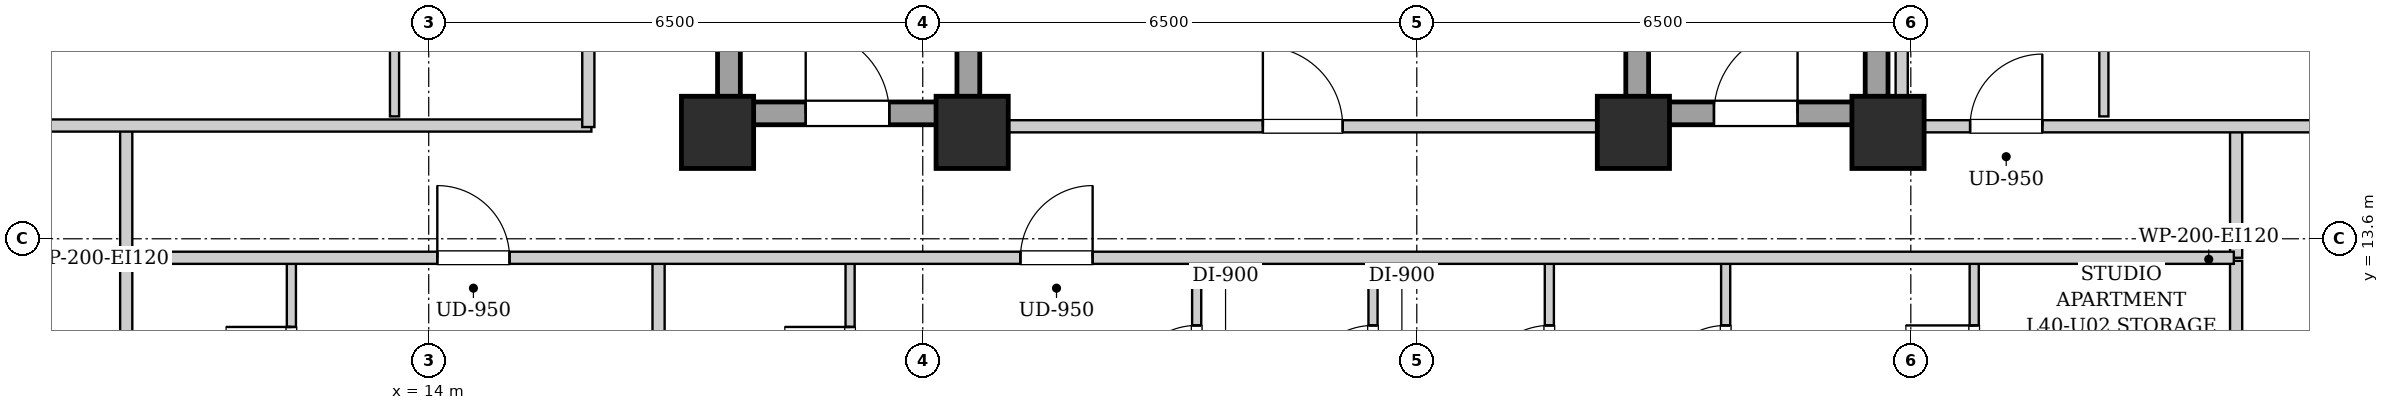
"""IFC4 building model, lengths in metres.
Left out: names, types, materials, properties, quantities, classifications, styles, units other than length and angle.
Written with IfcOpenShell. Run it as: python <this file> out.ifc"""

import sys

from ifc_helpers import new_model, si_unit, direction, frame, frame_2d, origin, origin_2d, place, context, subcontext, project, spatial, rectangle, extrude, element, fill, save


model = new_model("IFC4")
c1 = context("Model", 3, precision=1e-05, world=origin(), true_north=direction((0.0, 1.0)))
c2 = subcontext(c1, "Body", "Model", "MODEL_VIEW")
j1 = project(units=[si_unit("LENGTHUNIT", "METRE"), si_unit("PLANEANGLEUNIT", "RADIAN")], contexts=[c1])
p1 = place(None, origin())
s1 = spatial("IfcSite", under=j1, at=p1, CompositionType="ELEMENT")
p2 = place(p1, origin())
s2 = spatial("IfcBuilding", under=s1, at=p2, CompositionType="ELEMENT")
p3 = place(p2, frame((0.0, 0.0, 140.65)))
s3 = spatial("IfcBuildingStorey", under=s2, at=p3, CompositionType="ELEMENT", Elevation=140.65)
for number, where, z_axis, x_axis in (
    (1, (17.8, 15.0, 0.0), (0.0, 0.0, 1.0), (1.0, 0.0, 0.0)),
    (2, (21.15, 15.0, 0.0), (0.0, 0.0, 1.0), (1.0, 0.0, 0.0)),
    (3, (29.85, 15.0, 0.0), (0.0, 0.0, 1.0), (1.0, 0.0, 0.0)),
    (4, (33.2, 15.0, 0.0), (0.0, 0.0, 1.0), (1.0, 0.0, 0.0)),
):
    element("IfcColumn", number, at=place(p3, frame(where, z_axis=z_axis, x_axis=x_axis)), inside=s3, PredefinedType="COLUMN", context=c2, shape_type="SweptSolid", body=[
        extrude(rectangle(XDim=0.95, YDim=0.95, at=origin_2d()), origin(), (0.0, 0.0, 1.0), 3.25),
    ])
for number, where, z_axis, x_axis in (
    (5, (17.95, 15.1, 0.0), (0.0, 0.0, 1.0), (0.0, 1.0, 0.0)),
    (6, (21.1, 15.1, 0.0), (0.0, 0.0, 1.0), (0.0, 1.0, 0.0)),
):
    element("IfcWall", number, at=place(p3, frame(where, z_axis=z_axis, x_axis=x_axis)), inside=s3, PredefinedType="SHEAR", context=c2, shape_type="SweptSolid", body=[
        extrude(rectangle(XDim=9.0, YDim=0.3, at=frame_2d((4.5, 0.0))), origin(), (0.0, 0.0, 1.0), 2.99),
    ])
p4 = place(p3, frame((18.1, 15.25, 0.0), z_axis=(0.0, 0.0, 1.0), x_axis=(1.0, 0.0, 0.0)))
e7 = element("IfcWall", 7, at=p4, inside=s3, PredefinedType="SHEAR", context=c2, shape_type="SweptSolid", body=[
    extrude(rectangle(XDim=2.85, YDim=0.3, at=frame_2d((1.425, 0.0))), origin(), (0.0, 0.0, 1.0), 2.99),
])
p5 = place(p4, frame((0.86, 0.0, 0.0)))
e8 = element("IfcOpeningElement", 8, at=p5, cuts=e7, PredefinedType="OPENING", context=c2, shape_type="SweptSolid", body=[
    extrude(rectangle(XDim=1.1, YDim=2.05, at=frame_2d((0.55, 1.025))), frame((0.0, 0.16, 0.0), z_axis=(0.0, -1.0, 0.0), x_axis=(1.0, 0.0, 0.0)), (0.0, 0.0, 1.0), 0.32),
])
for number, where, z_axis, x_axis in (
    (9, (29.9, 15.1, 0.0), (0.0, 0.0, 1.0), (0.0, 1.0, 0.0)),
    (10, (33.05, 15.1, 0.0), (0.0, 0.0, 1.0), (0.0, 1.0, 0.0)),
):
    element("IfcWall", number, at=place(p3, frame(where, z_axis=z_axis, x_axis=x_axis)), inside=s3, PredefinedType="SHEAR", context=c2, shape_type="SweptSolid", body=[
        extrude(rectangle(XDim=9.0, YDim=0.3, at=frame_2d((4.5, 0.0))), origin(), (0.0, 0.0, 1.0), 2.99),
    ])
p6 = place(p3, frame((30.05, 15.25, 0.0), z_axis=(0.0, 0.0, 1.0), x_axis=(1.0, 0.0, 0.0)))
e11 = element("IfcWall", 11, at=p6, inside=s3, PredefinedType="SHEAR", context=c2, shape_type="SweptSolid", body=[
    extrude(rectangle(XDim=2.85, YDim=0.3, at=frame_2d((1.425, 0.0))), origin(), (0.0, 0.0, 1.0), 2.99),
])
p7 = place(p6, frame((0.86, 0.0, 0.0)))
e12 = element("IfcOpeningElement", 12, at=p7, cuts=e11, PredefinedType="OPENING", context=c2, shape_type="SweptSolid", body=[
    extrude(rectangle(XDim=1.1, YDim=2.05, at=frame_2d((0.55, 1.025))), frame((0.0, 0.16, 0.0), z_axis=(0.0, -1.0, 0.0), x_axis=(1.0, 0.0, 0.0)), (0.0, 0.0, 1.0), 0.32),
])
p8 = place(p3, frame((21.25, 15.08, 0.0), z_axis=(0.0, 0.0, 1.0), x_axis=(1.0, 0.0, 0.0)))
e13 = element("IfcWall", 13, at=p8, inside=s3, PredefinedType="PARTITIONING", context=c2, shape_type="SweptSolid", body=[
    extrude(rectangle(XDim=8.5, YDim=0.16, at=frame_2d((4.25, 0.0))), origin(), (0.0, 0.0, 1.0), 2.426),
])
p9 = place(p8, frame((3.725, 0.0, 0.0)))
e14 = element("IfcOpeningElement", 14, at=p9, cuts=e13, PredefinedType="OPENING", context=c2, shape_type="SweptSolid", body=[
    extrude(rectangle(XDim=1.05, YDim=2.05, at=frame_2d((0.525, 1.025))), frame((0.0, 0.09, 0.0), z_axis=(0.0, -1.0, 0.0), x_axis=(1.0, 0.0, 0.0)), (0.0, 0.0, 1.0), 0.18),
])
for number, where, z_axis, x_axis in (
    (15, (10.02, 13.35, 0.0), (0.0, 0.0, 1.0), (0.0, 1.0, 0.0)),
    (16, (37.78, 13.35, 0.0), (0.0, 0.0, 1.0), (0.0, 1.0, 0.0)),
):
    element("IfcWall", number, at=place(p3, frame(where, z_axis=z_axis, x_axis=x_axis)), inside=s3, PredefinedType="PARTITIONING", context=c2, shape_type="SweptSolid", body=[
        extrude(rectangle(XDim=1.74, YDim=0.16, at=frame_2d((0.87, 0.0))), origin(), (0.0, 0.0, 1.0), 2.99),
    ])
p10 = place(p3, frame((7.78, 15.09, 0.0), z_axis=(0.0, 0.0, 1.0), x_axis=(1.0, 0.0, 0.0)))
e17 = element("IfcWall", 17, at=p10, inside=s3, PredefinedType="PARTITIONING", context=c2, shape_type="SweptSolid", body=[
    extrude(rectangle(XDim=8.36, YDim=0.16, at=frame_2d((4.18, 0.0))), origin(), (0.0, 0.0, 1.0), 2.426),
])
p11 = place(p3, frame((10.02, 10.65, 0.0), z_axis=(0.0, 0.0, 1.0), x_axis=(0.0, 1.0, 0.0)))
e18 = element("IfcWall", 18, at=p11, inside=s3, PredefinedType="PARTITIONING", context=c2, shape_type="SweptSolid", body=[
    extrude(rectangle(XDim=2.66, YDim=0.16, at=frame_2d((1.33, 0.0))), origin(), (0.0, 0.0, 1.0), 2.99),
])
p12 = place(p3, frame((12.193, 10.71, 0.0), z_axis=(0.0, 0.0, 1.0), x_axis=(0.0, 1.0, 0.0)))
e19 = element("IfcWall", 19, at=p12, inside=s3, PredefinedType="PARTITIONING", context=c2, shape_type="SweptSolid", body=[
    extrude(rectangle(XDim=2.6, YDim=0.12, at=frame_2d((1.3, 0.0))), origin(), (0.0, 0.0, 1.0), 2.99),
])
p13 = place(p12, frame((0.87, 0.0, 0.0)))
e20 = element("IfcOpeningElement", 20, at=p13, cuts=e19, PredefinedType="OPENING", context=c2, shape_type="SweptSolid", body=[
    extrude(rectangle(XDim=0.86, YDim=2.05, at=frame_2d((0.43, 1.025))), frame((0.0, 0.07, 0.0), z_axis=(0.0, -1.0, 0.0), x_axis=(1.0, 0.0, 0.0)), (0.0, 0.0, 1.0), 0.14),
])
p14 = place(p3, frame((37.78, 10.65, 0.0), z_axis=(0.0, 0.0, 1.0), x_axis=(0.0, 1.0, 0.0)))
e21 = element("IfcWall", 21, at=p14, inside=s3, PredefinedType="PARTITIONING", context=c2, shape_type="SweptSolid", body=[
    extrude(rectangle(XDim=2.66, YDim=0.16, at=frame_2d((1.33, 0.0))), origin(), (0.0, 0.0, 1.0), 2.99),
])
p15 = place(p3, frame((17.024, 6.06, 0.0), z_axis=(0.0, 0.0, 1.0), x_axis=(0.0, 1.0, 0.0)))
e22 = element("IfcWall", 22, at=p15, inside=s3, PredefinedType="PARTITIONING", context=c2, shape_type="SweptSolid", body=[
    extrude(rectangle(XDim=7.25, YDim=0.16, at=frame_2d((3.625, 0.0))), origin(), (0.0, 0.0, 1.0), 2.99),
])
p16 = place(p3, frame((19.544, 10.71, 0.0), z_axis=(0.0, 0.0, 1.0), x_axis=(0.0, 1.0, 0.0)))
e23 = element("IfcWall", 23, at=p16, inside=s3, PredefinedType="PARTITIONING", context=c2, shape_type="SweptSolid", body=[
    extrude(rectangle(XDim=2.6, YDim=0.12, at=frame_2d((1.3, 0.0))), origin(), (0.0, 0.0, 1.0), 2.99),
])
p17 = place(p16, frame((0.87, 0.0, 0.0)))
e24 = element("IfcOpeningElement", 24, at=p17, cuts=e23, PredefinedType="OPENING", context=c2, shape_type="SweptSolid", body=[
    extrude(rectangle(XDim=0.86, YDim=2.05, at=frame_2d((0.43, 1.025))), frame((0.0, 0.07, 0.0), z_axis=(0.0, -1.0, 0.0), x_axis=(1.0, 0.0, 0.0)), (0.0, 0.0, 1.0), 0.14),
])
p18 = place(p3, frame((24.104, 10.71, 0.0), z_axis=(0.0, 0.0, 1.0), x_axis=(0.0, 1.0, 0.0)))
e25 = element("IfcWall", 25, at=p18, inside=s3, PredefinedType="PARTITIONING", context=c2, shape_type="SweptSolid", body=[
    extrude(rectangle(XDim=2.6, YDim=0.12, at=frame_2d((1.3, 0.0))), origin(), (0.0, 0.0, 1.0), 2.99),
])
p19 = place(p18, frame((0.85, 0.0, 0.0)))
e26 = element("IfcOpeningElement", 26, at=p19, cuts=e25, PredefinedType="OPENING", context=c2, shape_type="SweptSolid", body=[
    extrude(rectangle(XDim=0.9, YDim=2.05, at=frame_2d((0.45, 1.025))), frame((0.0, 0.07, 0.0), z_axis=(0.0, -1.0, 0.0), x_axis=(1.0, 0.0, 0.0)), (0.0, 0.0, 1.0), 0.14),
])
p20 = place(p3, frame((26.424, 10.71, 0.0), z_axis=(0.0, 0.0, 1.0), x_axis=(0.0, 1.0, 0.0)))
e27 = element("IfcWall", 27, at=p20, inside=s3, PredefinedType="PARTITIONING", context=c2, shape_type="SweptSolid", body=[
    extrude(rectangle(XDim=2.6, YDim=0.12, at=frame_2d((1.3, 0.0))), origin(), (0.0, 0.0, 1.0), 2.99),
])
p21 = place(p20, frame((0.85, 0.0, 0.0)))
e28 = element("IfcOpeningElement", 28, at=p21, cuts=e27, PredefinedType="OPENING", context=c2, shape_type="SweptSolid", body=[
    extrude(rectangle(XDim=0.9, YDim=2.05, at=frame_2d((0.45, 1.025))), frame((0.0, 0.07, 0.0), z_axis=(0.0, -1.0, 0.0), x_axis=(1.0, 0.0, 0.0)), (0.0, 0.0, 1.0), 0.14),
])
p22 = place(p3, frame((28.744, 10.71, 0.0), z_axis=(0.0, 0.0, 1.0), x_axis=(0.0, 1.0, 0.0)))
e29 = element("IfcWall", 29, at=p22, inside=s3, PredefinedType="PARTITIONING", context=c2, shape_type="SweptSolid", body=[
    extrude(rectangle(XDim=2.6, YDim=0.12, at=frame_2d((1.3, 0.0))), origin(), (0.0, 0.0, 1.0), 2.99),
])
p23 = place(p22, frame((0.85, 0.0, 0.0)))
e30 = element("IfcOpeningElement", 30, at=p23, cuts=e29, PredefinedType="OPENING", context=c2, shape_type="SweptSolid", body=[
    extrude(rectangle(XDim=0.9, YDim=2.05, at=frame_2d((0.45, 1.025))), frame((0.0, 0.07, 0.0), z_axis=(0.0, -1.0, 0.0), x_axis=(1.0, 0.0, 0.0)), (0.0, 0.0, 1.0), 0.14),
])
p24 = place(p3, frame((31.064, 10.71, 0.0), z_axis=(0.0, 0.0, 1.0), x_axis=(0.0, 1.0, 0.0)))
e31 = element("IfcWall", 31, at=p24, inside=s3, PredefinedType="PARTITIONING", context=c2, shape_type="SweptSolid", body=[
    extrude(rectangle(XDim=2.6, YDim=0.12, at=frame_2d((1.3, 0.0))), origin(), (0.0, 0.0, 1.0), 2.99),
])
p25 = place(p24, frame((0.85, 0.0, 0.0)))
e32 = element("IfcOpeningElement", 32, at=p25, cuts=e31, PredefinedType="OPENING", context=c2, shape_type="SweptSolid", body=[
    extrude(rectangle(XDim=0.9, YDim=2.05, at=frame_2d((0.45, 1.025))), frame((0.0, 0.07, 0.0), z_axis=(0.0, -1.0, 0.0), x_axis=(1.0, 0.0, 0.0)), (0.0, 0.0, 1.0), 0.14),
])
p26 = place(p3, frame((34.334, 10.71, 0.0), z_axis=(0.0, 0.0, 1.0), x_axis=(0.0, 1.0, 0.0)))
e33 = element("IfcWall", 33, at=p26, inside=s3, PredefinedType="PARTITIONING", context=c2, shape_type="SweptSolid", body=[
    extrude(rectangle(XDim=2.6, YDim=0.12, at=frame_2d((1.3, 0.0))), origin(), (0.0, 0.0, 1.0), 2.99),
])
p27 = place(p26, frame((0.85, 0.0, 0.0)))
e34 = element("IfcOpeningElement", 34, at=p27, cuts=e33, PredefinedType="OPENING", context=c2, shape_type="SweptSolid", body=[
    extrude(rectangle(XDim=0.9, YDim=2.05, at=frame_2d((0.45, 1.025))), frame((0.0, 0.07, 0.0), z_axis=(0.0, -1.0, 0.0), x_axis=(1.0, 0.0, 0.0)), (0.0, 0.0, 1.0), 0.14),
])
p28 = place(p3, frame((13.55, 15.21, 0.0), z_axis=(0.0, 0.0, 1.0), x_axis=(0.0, 1.0, 0.0)))
e35 = element("IfcWall", 35, at=p28, inside=s3, PredefinedType="PARTITIONING", context=c2, shape_type="SweptSolid", body=[
    extrude(rectangle(XDim=1.85, YDim=0.12, at=frame_2d((0.925, 0.0))), origin(), (0.0, 0.0, 1.0), 2.99),
])
p29 = place(p3, frame((33.38, 15.08, 0.0), z_axis=(0.0, 0.0, 1.0), x_axis=(1.0, 0.0, 0.0)))
e36 = element("IfcWall", 36, at=p29, inside=s3, PredefinedType="PARTITIONING", context=c2, shape_type="SweptSolid", body=[
    extrude(rectangle(XDim=6.64, YDim=0.16, at=frame_2d((3.32, 0.0))), origin(), (0.0, 0.0, 1.0), 2.426),
])
p30 = place(p29, frame((0.9, 0.0, 0.0)))
e37 = element("IfcOpeningElement", 37, at=p30, cuts=e36, PredefinedType="OPENING", context=c2, shape_type="SweptSolid", body=[
    extrude(rectangle(XDim=0.95, YDim=2.1, at=frame_2d((0.475, 1.05))), frame((0.0, 0.09, 0.0), z_axis=(0.0, -1.0, 0.0), x_axis=(1.0, 0.0, 0.0)), (0.0, 0.0, 1.0), 0.18),
])
p31 = place(p3, frame((36.04, 15.21, 0.0), z_axis=(0.0, 0.0, 1.0), x_axis=(0.0, 1.0, 0.0)))
e38 = element("IfcWall", 38, at=p31, inside=s3, PredefinedType="PARTITIONING", context=c2, shape_type="SweptSolid", body=[
    extrude(rectangle(XDim=4.308, YDim=0.12, at=frame_2d((2.154, 0.0))), origin(), (0.0, 0.0, 1.0), 2.99),
])
p32 = place(p31, frame((1.704, 0.0, 0.0)))
e39 = element("IfcOpeningElement", 39, at=p32, cuts=e38, PredefinedType="OPENING", context=c2, shape_type="SweptSolid", body=[
    extrude(rectangle(XDim=0.9, YDim=2.05, at=frame_2d((0.45, 1.025))), frame((0.0, 0.07, 0.0), z_axis=(0.0, -1.0, 0.0), x_axis=(1.0, 0.0, 0.0)), (0.0, 0.0, 1.0), 0.14),
])
p33 = place(p3, frame((10.05, 13.35, 0.0), z_axis=(0.0, 0.0, 1.0), x_axis=(1.0, 0.0, 0.0)))
e40 = element("IfcWall", 40, at=p33, inside=s3, PredefinedType="PARTITIONING", context=c2, shape_type="SweptSolid", body=[
    extrude(rectangle(XDim=27.7, YDim=0.16, at=frame_2d((13.85, 0.0))), origin(), (0.0, 0.0, 1.0), 2.99),
])
p34 = place(p33, frame((4.063, 0.0, 0.0)))
e41 = element("IfcOpeningElement", 41, at=p34, cuts=e40, PredefinedType="OPENING", context=c2, shape_type="SweptSolid", body=[
    extrude(rectangle(XDim=0.95, YDim=2.1, at=frame_2d((0.475, 1.05))), frame((0.0, 0.09, 0.0), z_axis=(0.0, -1.0, 0.0), x_axis=(1.0, 0.0, 0.0)), (0.0, 0.0, 1.0), 0.18),
])
p35 = place(p33, frame((11.735, 0.0, 0.0)))
e42 = element("IfcOpeningElement", 42, at=p35, cuts=e40, PredefinedType="OPENING", context=c2, shape_type="SweptSolid", body=[
    extrude(rectangle(XDim=0.95, YDim=2.1, at=frame_2d((0.475, 1.05))), frame((0.0, 0.09, 0.0), z_axis=(0.0, -1.0, 0.0), x_axis=(1.0, 0.0, 0.0)), (0.0, 0.0, 1.0), 0.18),
])
p36 = place(p3, frame((16.1, 15.07, 0.0), z_axis=(0.0, 0.0, 1.0), x_axis=(0.0, 1.0, 0.0)))
e43 = element("IfcWall", 43, at=p36, inside=s3, PredefinedType="PARTITIONING", context=c2, shape_type="SweptSolid", body=[
    extrude(rectangle(XDim=13.93, YDim=0.16, at=frame_2d((6.965, 0.0))), origin(), (0.0, 0.0, 1.0), 2.99),
])
p37 = place(p36, frame((3.608, 0.0, 0.0)))
e44 = element("IfcOpeningElement", 44, at=p37, cuts=e43, PredefinedType="OPENING", context=c2, shape_type="SweptSolid", body=[
    extrude(rectangle(XDim=0.95, YDim=2.1, at=frame_2d((0.475, 1.05))), frame((0.0, 0.09, 0.0), z_axis=(0.0, -1.0, 0.0), x_axis=(1.0, 0.0, 0.0)), (0.0, 0.0, 1.0), 0.18),
])
p38 = place(p36, frame((10.649, 0.0, 0.0)))
e45 = element("IfcOpeningElement", 45, at=p38, cuts=e43, PredefinedType="OPENING", context=c2, shape_type="SweptSolid", body=[
    extrude(rectangle(XDim=0.95, YDim=2.1, at=frame_2d((0.475, 1.05))), frame((0.0, 0.09, 0.0), z_axis=(0.0, -1.0, 0.0), x_axis=(1.0, 0.0, 0.0)), (0.0, 0.0, 1.0), 0.18),
])
p39 = place(p3, frame((33.38, 15.02, 0.0), z_axis=(0.0, 0.0, 1.0), x_axis=(0.0, 1.0, 0.0)))
e46 = element("IfcWall", 46, at=p39, inside=s3, PredefinedType="PARTITIONING", context=c2, shape_type="SweptSolid", body=[
    extrude(rectangle(XDim=13.98, YDim=0.16, at=frame_2d((6.99, 0.0))), origin(), (0.0, 0.0, 1.0), 2.99),
])
p40 = place(p5, origin())
e47 = element("IfcDoor", 47, at=p40, inside=s3, OperationType="SINGLE_SWING_LEFT", PredefinedType="DOOR", context=c2, shape_type="SweptSolid", body=[
    extrude(rectangle(XDim=1.1, YDim=2.05, at=frame_2d((0.55, 1.025))), frame((0.0, 0.025, 0.0), z_axis=(0.0, -1.0, 0.0), x_axis=(1.0, 0.0, 0.0)), (0.0, 0.0, 1.0), 0.05),
])
fill(e8, e47)
p41 = place(p7, origin())
e48 = element("IfcDoor", 48, at=p41, inside=s3, OperationType="SINGLE_SWING_RIGHT", PredefinedType="DOOR", context=c2, shape_type="SweptSolid", body=[
    extrude(rectangle(XDim=1.1, YDim=2.05, at=frame_2d((0.55, 1.025))), frame((0.0, 0.025, 0.0), z_axis=(0.0, -1.0, 0.0), x_axis=(1.0, 0.0, 0.0)), (0.0, 0.0, 1.0), 0.05),
])
fill(e12, e48)
p42 = place(p9, origin())
e49 = element("IfcDoor", 49, at=p42, inside=s3, OperationType="SINGLE_SWING_LEFT", PredefinedType="DOOR", context=c2, shape_type="SweptSolid", body=[
    extrude(rectangle(XDim=1.05, YDim=2.05, at=frame_2d((0.525, 1.025))), frame((0.0, 0.025, 0.0), z_axis=(0.0, -1.0, 0.0), x_axis=(1.0, 0.0, 0.0)), (0.0, 0.0, 1.0), 0.05),
])
fill(e14, e49)
p43 = place(p13, origin())
e50 = element("IfcDoor", 50, at=p43, inside=s3, OperationType="SINGLE_SWING_RIGHT", PredefinedType="DOOR", context=c2, shape_type="SweptSolid", body=[
    extrude(rectangle(XDim=0.86, YDim=2.05, at=frame_2d((0.43, 1.025))), frame((0.0, 0.025, 0.0), z_axis=(0.0, -1.0, 0.0), x_axis=(1.0, 0.0, 0.0)), (0.0, 0.0, 1.0), 0.05),
])
fill(e20, e50)
p44 = place(p17, origin())
e51 = element("IfcDoor", 51, at=p44, inside=s3, OperationType="SINGLE_SWING_RIGHT", PredefinedType="DOOR", context=c2, shape_type="SweptSolid", body=[
    extrude(rectangle(XDim=0.86, YDim=2.05, at=frame_2d((0.43, 1.025))), frame((0.0, 0.025, 0.0), z_axis=(0.0, -1.0, 0.0), x_axis=(1.0, 0.0, 0.0)), (0.0, 0.0, 1.0), 0.05),
])
fill(e24, e51)
p45 = place(p19, origin())
e52 = element("IfcDoor", 52, at=p45, inside=s3, OperationType="SINGLE_SWING_LEFT", PredefinedType="DOOR", context=c2, shape_type="SweptSolid", body=[
    extrude(rectangle(XDim=0.9, YDim=2.05, at=frame_2d((0.45, 1.025))), frame((0.0, 0.025, 0.0), z_axis=(0.0, -1.0, 0.0), x_axis=(1.0, 0.0, 0.0)), (0.0, 0.0, 1.0), 0.05),
])
fill(e26, e52)
p46 = place(p21, origin())
e53 = element("IfcDoor", 53, at=p46, inside=s3, OperationType="SINGLE_SWING_LEFT", PredefinedType="DOOR", context=c2, shape_type="SweptSolid", body=[
    extrude(rectangle(XDim=0.9, YDim=2.05, at=frame_2d((0.45, 1.025))), frame((0.0, 0.025, 0.0), z_axis=(0.0, -1.0, 0.0), x_axis=(1.0, 0.0, 0.0)), (0.0, 0.0, 1.0), 0.05),
])
fill(e28, e53)
p47 = place(p23, origin())
e54 = element("IfcDoor", 54, at=p47, inside=s3, OperationType="SINGLE_SWING_LEFT", PredefinedType="DOOR", context=c2, shape_type="SweptSolid", body=[
    extrude(rectangle(XDim=0.9, YDim=2.05, at=frame_2d((0.45, 1.025))), frame((0.0, 0.025, 0.0), z_axis=(0.0, -1.0, 0.0), x_axis=(1.0, 0.0, 0.0)), (0.0, 0.0, 1.0), 0.05),
])
fill(e30, e54)
p48 = place(p25, origin())
e55 = element("IfcDoor", 55, at=p48, inside=s3, OperationType="SINGLE_SWING_LEFT", PredefinedType="DOOR", context=c2, shape_type="SweptSolid", body=[
    extrude(rectangle(XDim=0.9, YDim=2.05, at=frame_2d((0.45, 1.025))), frame((0.0, 0.025, 0.0), z_axis=(0.0, -1.0, 0.0), x_axis=(1.0, 0.0, 0.0)), (0.0, 0.0, 1.0), 0.05),
])
fill(e32, e55)
p49 = place(p27, origin())
e56 = element("IfcDoor", 56, at=p49, inside=s3, OperationType="SINGLE_SWING_RIGHT", PredefinedType="DOOR", context=c2, shape_type="SweptSolid", body=[
    extrude(rectangle(XDim=0.9, YDim=2.05, at=frame_2d((0.45, 1.025))), frame((0.0, 0.025, 0.0), z_axis=(0.0, -1.0, 0.0), x_axis=(1.0, 0.0, 0.0)), (0.0, 0.0, 1.0), 0.05),
])
fill(e34, e56)
p50 = place(p30, origin())
e57 = element("IfcDoor", 57, at=p50, inside=s3, OperationType="SINGLE_SWING_RIGHT", PredefinedType="DOOR", context=c2, shape_type="SweptSolid", body=[
    extrude(rectangle(XDim=0.95, YDim=2.1, at=frame_2d((0.475, 1.05))), frame((0.0, 0.025, 0.0), z_axis=(0.0, -1.0, 0.0), x_axis=(1.0, 0.0, 0.0)), (0.0, 0.0, 1.0), 0.05),
])
fill(e37, e57)
p51 = place(p34, origin())
e58 = element("IfcDoor", 58, at=p51, inside=s3, OperationType="SINGLE_SWING_LEFT", PredefinedType="DOOR", context=c2, shape_type="SweptSolid", body=[
    extrude(rectangle(XDim=0.95, YDim=2.1, at=frame_2d((0.475, 1.05))), frame((0.0, 0.025, 0.0), z_axis=(0.0, -1.0, 0.0), x_axis=(1.0, 0.0, 0.0)), (0.0, 0.0, 1.0), 0.05),
])
fill(e41, e58)
p52 = place(p35, origin())
e59 = element("IfcDoor", 59, at=p52, inside=s3, OperationType="SINGLE_SWING_RIGHT", PredefinedType="DOOR", context=c2, shape_type="SweptSolid", body=[
    extrude(rectangle(XDim=0.95, YDim=2.1, at=frame_2d((0.475, 1.05))), frame((0.0, 0.025, 0.0), z_axis=(0.0, -1.0, 0.0), x_axis=(1.0, 0.0, 0.0)), (0.0, 0.0, 1.0), 0.05),
])
fill(e42, e59)
save(model, sys.argv[1])
